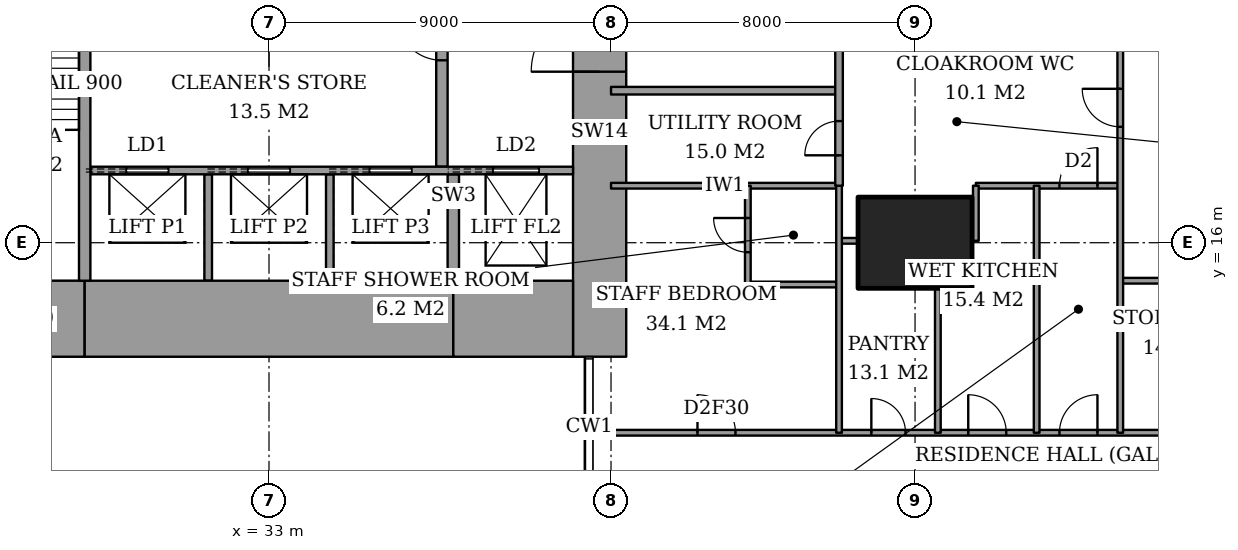
"""IFC4 building model, lengths in metres.
Left out: names, types, materials, properties, quantities, classifications, styles, units other than length and angle.
Written with IfcOpenShell. Run it as: python <this file> out.ifc"""

import sys

from ifc_helpers import new_model, si_unit, direction, frame, frame_2d, origin, origin_2d, place, context, subcontext, project, spatial, rectangle, extrude, element, fill, save


model = new_model("IFC4")
c1 = context("Model", 3, precision=1e-05, world=origin(), true_north=direction((0.0, 1.0)))
c2 = subcontext(c1, "Body", "Model", "MODEL_VIEW")
j1 = project(units=[si_unit("LENGTHUNIT", "METRE"), si_unit("PLANEANGLEUNIT", "RADIAN")], contexts=[c1])
p1 = place(None, origin())
s1 = spatial("IfcSite", under=j1, at=p1, CompositionType="ELEMENT")
p2 = place(p1, origin())
s2 = spatial("IfcBuilding", under=s1, at=p2, CompositionType="ELEMENT")
p3 = place(p2, frame((0.0, 0.0, 164.6)))
s3 = spatial("IfcBuildingStorey", under=s2, at=p3, CompositionType="ELEMENT", Elevation=164.6)
p4 = place(p3, frame((50.0, 16.0, 0.0), z_axis=(0.0, 0.0, 1.0), x_axis=(1.0, 0.0, 0.0)))
e1 = element("IfcColumn", 1, at=p4, inside=s3, PredefinedType="COLUMN", context=c2, shape_type="SweptSolid", body=[
    extrude(rectangle(XDim=3.0, YDim=2.4, at=origin_2d()), origin(), (0.0, 0.0, 1.0), 3.6),
])
p5 = place(p3, frame((25.0, 14.0, 0.0), z_axis=(0.0, 0.0, 1.0), x_axis=(1.0, 0.0, 0.0)))
e2 = element("IfcWall", 2, at=p5, inside=s3, PredefinedType="SHEAR", context=c2, shape_type="SweptSolid", body=[
    extrude(rectangle(XDim=3.15, YDim=2.0, at=frame_2d((1.575, 0.0))), origin(), (0.0, 0.0, 1.0), 3.6),
])
p6 = place(p3, frame((28.15, 14.0, 0.0), z_axis=(0.0, 0.0, 1.0), x_axis=(1.0, 0.0, 0.0)))
e3 = element("IfcWall", 3, at=p6, inside=s3, PredefinedType="SHEAR", context=c2, shape_type="SweptSolid", body=[
    extrude(rectangle(XDim=9.7, YDim=2.0, at=frame_2d((4.85, 0.0))), origin(), (0.0, 0.0, 1.0), 3.6),
])
p7 = place(p3, frame((37.85, 14.0, 0.0), z_axis=(0.0, 0.0, 1.0), x_axis=(1.0, 0.0, 0.0)))
e4 = element("IfcWall", 4, at=p7, inside=s3, PredefinedType="SHEAR", context=c2, shape_type="SweptSolid", body=[
    extrude(rectangle(XDim=3.15, YDim=2.0, at=frame_2d((1.575, 0.0))), origin(), (0.0, 0.0, 1.0), 3.6),
])
p8 = place(p3, frame((41.7, 13.0, 0.0), z_axis=(0.0, 0.0, 1.0), x_axis=(0.0, 1.0, 0.0)))
e5 = element("IfcWall", 5, at=p8, inside=s3, PredefinedType="SHEAR", context=c2, shape_type="SweptSolid", body=[
    extrude(rectangle(XDim=11.85, YDim=1.4, at=frame_2d((5.925, 0.0))), origin(), (0.0, 0.0, 1.0), 3.6),
])
p9 = place(p8, frame((7.5, 0.0, 0.0)))
e6 = element("IfcOpeningElement", 6, at=p9, cuts=e5, PredefinedType="OPENING", context=c2, shape_type="SweptSolid", body=[
    extrude(rectangle(XDim=1.8, YDim=2.4, at=frame_2d((0.9, 1.2))), frame((0.0, 0.71, 0.0), z_axis=(0.0, -1.0, 0.0), x_axis=(1.0, 0.0, 0.0)), (0.0, 0.0, 1.0), 1.42),
])
p10 = place(p3, frame((28.15, 15.0, 0.0), z_axis=(0.0, 0.0, 1.0), x_axis=(0.0, 1.0, 0.0)))
e7 = element("IfcWall", 7, at=p10, inside=s3, PredefinedType="SHEAR", context=c2, shape_type="SweptSolid", body=[
    extrude(rectangle(XDim=8.15, YDim=0.3, at=frame_2d((4.075, 0.0))), origin(), (0.0, 0.0, 1.0), 3.6),
])
p11 = place(p3, frame((37.55, 18.0, 0.0), z_axis=(0.0, 0.0, 1.0), x_axis=(0.0, 1.0, 0.0)))
e8 = element("IfcWall", 8, at=p11, inside=s3, PredefinedType="PARTITIONING", context=c2, shape_type="SweptSolid", body=[
    extrude(rectangle(XDim=6.7, YDim=0.3, at=frame_2d((3.35, 0.0))), origin(), (0.0, 0.0, 1.0), 3.6),
])
p12 = place(p11, frame((2.8, 0.0, 0.0)))
e9 = element("IfcOpeningElement", 9, at=p12, cuts=e8, PredefinedType="OPENING", context=c2, shape_type="SweptSolid", body=[
    extrude(rectangle(XDim=1.2, YDim=2.1, at=frame_2d((0.6, 1.05))), frame((0.0, 0.16, 0.0), z_axis=(0.0, -1.0, 0.0), x_axis=(1.0, 0.0, 0.0)), (0.0, 0.0, 1.0), 0.32),
])
p13 = place(p3, frame((41.439, 11.0, 0.0), z_axis=(0.0, 0.0, 1.0), x_axis=(1.0, 0.0, 0.0)))
e10 = element("IfcWall", 10, at=p13, inside=s3, PredefinedType="PARTITIONING", context=c2, shape_type="SweptSolid", body=[
    extrude(rectangle(XDim=25.011, YDim=0.15, at=frame_2d((12.505, 0.0))), origin(), (0.0, 0.0, 1.0), 3.35),
])
p14 = place(p13, frame((12.361, 0.0, 0.0)))
e11 = element("IfcOpeningElement", 11, at=p14, cuts=e10, PredefinedType="OPENING", context=c2, shape_type="SweptSolid", body=[
    extrude(rectangle(XDim=1.0, YDim=2.1, at=frame_2d((0.5, 1.05))), frame((0.0, 0.085, 0.0), z_axis=(0.0, -1.0, 0.0), x_axis=(1.0, 0.0, 0.0)), (0.0, 0.0, 1.0), 0.17),
])
p15 = place(p13, frame((20.924, 0.0, 0.0)))
e12 = element("IfcOpeningElement", 12, at=p15, cuts=e10, PredefinedType="OPENING", context=c2, shape_type="SweptSolid", body=[
    extrude(rectangle(XDim=1.0, YDim=2.1, at=frame_2d((0.5, 1.05))), frame((0.0, 0.085, 0.0), z_axis=(0.0, -1.0, 0.0), x_axis=(1.0, 0.0, 0.0)), (0.0, 0.0, 1.0), 0.17),
])
p16 = place(p13, frame((15.448, 0.0, 0.0)))
e13 = element("IfcOpeningElement", 13, at=p16, cuts=e10, PredefinedType="OPENING", context=c2, shape_type="SweptSolid", body=[
    extrude(rectangle(XDim=0.9, YDim=2.1, at=frame_2d((0.45, 1.05))), frame((0.0, 0.085, 0.0), z_axis=(0.0, -1.0, 0.0), x_axis=(1.0, 0.0, 0.0)), (0.0, 0.0, 1.0), 0.17),
])
p17 = place(p13, frame((9.961, 0.0, 0.0)))
e14 = element("IfcOpeningElement", 14, at=p17, cuts=e10, PredefinedType="OPENING", context=c2, shape_type="SweptSolid", body=[
    extrude(rectangle(XDim=1.0, YDim=2.1, at=frame_2d((0.5, 1.05))), frame((0.0, 0.085, 0.0), z_axis=(0.0, -1.0, 0.0), x_axis=(1.0, 0.0, 0.0)), (0.0, 0.0, 1.0), 0.17),
])
p18 = place(p13, frame((7.411, 0.0, 0.0)))
e15 = element("IfcOpeningElement", 15, at=p18, cuts=e10, PredefinedType="OPENING", context=c2, shape_type="SweptSolid", body=[
    extrude(rectangle(XDim=0.9, YDim=2.1, at=frame_2d((0.45, 1.05))), frame((0.0, 0.085, 0.0), z_axis=(0.0, -1.0, 0.0), x_axis=(1.0, 0.0, 0.0)), (0.0, 0.0, 1.0), 0.17),
])
p19 = place(p13, frame((2.836, 0.0, 0.0)))
e16 = element("IfcOpeningElement", 16, at=p19, cuts=e10, PredefinedType="OPENING", context=c2, shape_type="SweptSolid", body=[
    extrude(rectangle(XDim=1.0, YDim=2.1, at=frame_2d((0.5, 1.05))), frame((0.0, 0.085, 0.0), z_axis=(0.0, -1.0, 0.0), x_axis=(1.0, 0.0, 0.0)), (0.0, 0.0, 1.0), 0.17),
])
p20 = place(p3, frame((45.6, 14.9, 0.0), z_axis=(0.0, 0.0, 1.0), x_axis=(1.0, 0.0, 0.0)))
e17 = element("IfcWall", 17, at=p20, inside=s3, PredefinedType="PARTITIONING", context=c2, shape_type="SweptSolid", body=[
    extrude(rectangle(XDim=2.4, YDim=0.15, at=frame_2d((1.2, 0.0))), origin(), (0.0, 0.0, 1.0), 3.35),
])
p21 = place(p3, frame((55.4, 15.0, 0.0), z_axis=(0.0, 0.0, 1.0), x_axis=(1.0, 0.0, 0.0)))
e18 = element("IfcWall", 18, at=p21, inside=s3, PredefinedType="PARTITIONING", context=c2, shape_type="SweptSolid", body=[
    extrude(rectangle(XDim=1.1, YDim=0.15, at=frame_2d((0.55, 0.0))), origin(), (0.0, 0.0, 1.0), 3.35),
])
p22 = place(p3, frame((48.0, 16.05, 0.0), z_axis=(0.0, 0.0, 1.0), x_axis=(1.0, 0.0, 0.0)))
e19 = element("IfcWall", 19, at=p22, inside=s3, PredefinedType="PARTITIONING", context=c2, shape_type="SweptSolid", body=[
    extrude(rectangle(XDim=0.5, YDim=0.15, at=frame_2d((0.25, 0.0))), origin(), (0.0, 0.0, 1.0), 2.634),
])
p23 = place(p3, frame((42.0, 17.5, 0.0), z_axis=(0.0, 0.0, 1.0), x_axis=(1.0, 0.0, 0.0)))
e20 = element("IfcWall", 20, at=p23, inside=s3, PredefinedType="PARTITIONING", context=c2, shape_type="SweptSolid", body=[
    extrude(rectangle(XDim=6.0, YDim=0.15, at=frame_2d((3.0, 0.0))), origin(), (0.0, 0.0, 1.0), 3.35),
])
p24 = place(p3, frame((51.6, 17.5, 0.0), z_axis=(0.0, 0.0, 1.0), x_axis=(1.0, 0.0, 0.0)))
e21 = element("IfcWall", 21, at=p24, inside=s3, PredefinedType="PARTITIONING", context=c2, shape_type="SweptSolid", body=[
    extrude(rectangle(XDim=3.8, YDim=0.15, at=frame_2d((1.9, 0.0))), origin(), (0.0, 0.0, 1.0), 3.35),
])
p25 = place(p24, frame((2.2, 0.0, 0.0)))
e22 = element("IfcOpeningElement", 22, at=p25, cuts=e21, PredefinedType="OPENING", context=c2, shape_type="SweptSolid", body=[
    extrude(rectangle(XDim=1.0, YDim=2.1, at=frame_2d((0.5, 1.05))), frame((0.0, 0.085, 0.0), z_axis=(0.0, -1.0, 0.0), x_axis=(1.0, 0.0, 0.0)), (0.0, 0.0, 1.0), 0.17),
])
p26 = place(p3, frame((42.0, 20.0, 0.0), z_axis=(0.0, 0.0, 1.0), x_axis=(1.0, 0.0, 0.0)))
e23 = element("IfcWall", 23, at=p26, inside=s3, PredefinedType="PARTITIONING", context=c2, shape_type="SweptSolid", body=[
    extrude(rectangle(XDim=6.0, YDim=0.2, at=frame_2d((3.0, 0.0))), origin(), (0.0, 0.0, 1.0), 3.35),
])
p27 = place(p3, frame((45.6, 14.9, 0.0), z_axis=(0.0, 0.0, 1.0), x_axis=(0.0, 1.0, 0.0)))
e24 = element("IfcWall", 24, at=p27, inside=s3, PredefinedType="PARTITIONING", context=c2, shape_type="SweptSolid", body=[
    extrude(rectangle(XDim=2.6, YDim=0.15, at=frame_2d((1.3, 0.0))), origin(), (0.0, 0.0, 1.0), 3.35),
])
p28 = place(p27, frame((0.85, 0.0, 0.0)))
e25 = element("IfcOpeningElement", 25, at=p28, cuts=e24, PredefinedType="OPENING", context=c2, shape_type="SweptSolid", body=[
    extrude(rectangle(XDim=0.9, YDim=2.1, at=frame_2d((0.45, 1.05))), frame((0.0, 0.085, 0.0), z_axis=(0.0, -1.0, 0.0), x_axis=(1.0, 0.0, 0.0)), (0.0, 0.0, 1.0), 0.17),
])
p29 = place(p3, frame((48.0, 17.5, 0.0), z_axis=(0.0, 0.0, 1.0), x_axis=(0.0, 1.0, 0.0)))
e26 = element("IfcWall", 26, at=p29, inside=s3, PredefinedType="PARTITIONING", context=c2, shape_type="SweptSolid", body=[
    extrude(rectangle(XDim=6.5, YDim=0.2, at=frame_2d((3.25, 0.0))), origin(), (0.0, 0.0, 1.0), 3.35),
])
p30 = place(p29, frame((3.9, 0.0, 0.0)))
e27 = element("IfcOpeningElement", 27, at=p30, cuts=e26, PredefinedType="OPENING", context=c2, shape_type="SweptSolid", body=[
    extrude(rectangle(XDim=1.2, YDim=2.4, at=frame_2d((0.6, 1.2))), frame((0.0, 0.11, 0.0), z_axis=(0.0, -1.0, 0.0), x_axis=(1.0, 0.0, 0.0)), (0.0, 0.0, 1.0), 0.22),
])
p31 = place(p29, frame((0.8, 0.0, 0.0)))
e28 = element("IfcOpeningElement", 28, at=p31, cuts=e26, PredefinedType="OPENING", context=c2, shape_type="SweptSolid", body=[
    extrude(rectangle(XDim=0.9, YDim=2.1, at=frame_2d((0.45, 1.05))), frame((0.0, 0.11, 0.0), z_axis=(0.0, -1.0, 0.0), x_axis=(1.0, 0.0, 0.0)), (0.0, 0.0, 1.0), 0.22),
])
p32 = place(p3, frame((48.0, 11.0, 0.0), z_axis=(0.0, 0.0, 1.0), x_axis=(0.0, 1.0, 0.0)))
e29 = element("IfcWall", 29, at=p32, inside=s3, PredefinedType="PARTITIONING", context=c2, shape_type="SweptSolid", body=[
    extrude(rectangle(XDim=6.5, YDim=0.15, at=frame_2d((3.25, 0.0))), origin(), (0.0, 0.0, 1.0), 3.35),
])
p33 = place(p3, frame((50.6, 11.0, 0.0), z_axis=(0.0, 0.0, 1.0), x_axis=(0.0, 1.0, 0.0)))
e30 = element("IfcWall", 30, at=p33, inside=s3, PredefinedType="PARTITIONING", context=c2, shape_type="SweptSolid", body=[
    extrude(rectangle(XDim=3.8, YDim=0.15, at=frame_2d((1.9, 0.0))), origin(), (0.0, 0.0, 1.0), 3.35),
])
p34 = place(p3, frame((51.6, 16.05, 0.0), z_axis=(0.0, 0.0, 1.0), x_axis=(0.0, 1.0, 0.0)))
e31 = element("IfcWall", 31, at=p34, inside=s3, PredefinedType="PARTITIONING", context=c2, shape_type="SweptSolid", body=[
    extrude(rectangle(XDim=1.45, YDim=0.15, at=frame_2d((0.725, 0.0))), origin(), (0.0, 0.0, 1.0), 3.35),
])
p35 = place(p3, frame((53.2, 11.0, 0.0), z_axis=(0.0, 0.0, 1.0), x_axis=(0.0, 1.0, 0.0)))
e32 = element("IfcWall", 32, at=p35, inside=s3, PredefinedType="PARTITIONING", context=c2, shape_type="SweptSolid", body=[
    extrude(rectangle(XDim=6.5, YDim=0.15, at=frame_2d((3.25, 0.0))), origin(), (0.0, 0.0, 1.0), 3.35),
])
p36 = place(p3, frame((55.4, 11.0, 0.0), z_axis=(0.0, 0.0, 1.0), x_axis=(0.0, 1.0, 0.0)))
e33 = element("IfcWall", 33, at=p36, inside=s3, PredefinedType="PARTITIONING", context=c2, shape_type="SweptSolid", body=[
    extrude(rectangle(XDim=10.6, YDim=0.15, at=frame_2d((5.3, 0.0))), origin(), (0.0, 0.0, 1.0), 3.35),
])
p37 = place(p36, frame((8.05, 0.0, 0.0)))
e34 = element("IfcOpeningElement", 34, at=p37, cuts=e33, PredefinedType="OPENING", context=c2, shape_type="SweptSolid", body=[
    extrude(rectangle(XDim=1.0, YDim=2.1, at=frame_2d((0.5, 1.05))), frame((0.0, 0.085, 0.0), z_axis=(0.0, -1.0, 0.0), x_axis=(1.0, 0.0, 0.0)), (0.0, 0.0, 1.0), 0.17),
])
p38 = place(p3, frame((28.3, 17.9, 0.0), z_axis=(0.0, 0.0, 1.0), x_axis=(1.0, 0.0, 0.0)))
e35 = element("IfcWall", 35, at=p38, inside=s3, PredefinedType="PARTITIONING", context=c2, shape_type="SweptSolid", body=[
    extrude(rectangle(XDim=12.7, YDim=0.2, at=frame_2d((6.35, 0.0))), origin(), (0.0, 0.0, 1.0), 3.6),
])
p39 = place(p38, frame((0.95, 0.0, 0.0)))
e36 = element("IfcOpeningElement", 36, at=p39, cuts=e35, PredefinedType="OPENING", context=c2, shape_type="SweptSolid", body=[
    extrude(rectangle(XDim=1.1, YDim=2.1, at=frame_2d((0.55, 1.05))), frame((0.0, 0.11, 0.0), z_axis=(0.0, -1.0, 0.0), x_axis=(1.0, 0.0, 0.0)), (0.0, 0.0, 1.0), 0.22),
])
p40 = place(p38, frame((4.15, 0.0, 0.0)))
e37 = element("IfcOpeningElement", 37, at=p40, cuts=e35, PredefinedType="OPENING", context=c2, shape_type="SweptSolid", body=[
    extrude(rectangle(XDim=1.1, YDim=2.1, at=frame_2d((0.55, 1.05))), frame((0.0, 0.11, 0.0), z_axis=(0.0, -1.0, 0.0), x_axis=(1.0, 0.0, 0.0)), (0.0, 0.0, 1.0), 0.22),
])
p41 = place(p38, frame((7.35, 0.0, 0.0)))
e38 = element("IfcOpeningElement", 38, at=p41, cuts=e35, PredefinedType="OPENING", context=c2, shape_type="SweptSolid", body=[
    extrude(rectangle(XDim=1.1, YDim=2.1, at=frame_2d((0.55, 1.05))), frame((0.0, 0.11, 0.0), z_axis=(0.0, -1.0, 0.0), x_axis=(1.0, 0.0, 0.0)), (0.0, 0.0, 1.0), 0.22),
])
p42 = place(p38, frame((10.6, 0.0, 0.0)))
e39 = element("IfcOpeningElement", 39, at=p42, cuts=e35, PredefinedType="OPENING", context=c2, shape_type="SweptSolid", body=[
    extrude(rectangle(XDim=1.2, YDim=2.1, at=frame_2d((0.6, 1.05))), frame((0.0, 0.11, 0.0), z_axis=(0.0, -1.0, 0.0), x_axis=(1.0, 0.0, 0.0)), (0.0, 0.0, 1.0), 0.22),
])
for number, where, z_axis, x_axis in (
    (40, (31.4, 15.0, 0.0), (0.0, 0.0, 1.0), (0.0, 1.0, 0.0)),
    (41, (34.6, 15.0, 0.0), (0.0, 0.0, 1.0), (0.0, 1.0, 0.0)),
):
    element("IfcWall", number, at=place(p3, frame(where, z_axis=z_axis, x_axis=x_axis)), inside=s3, PredefinedType="PARTITIONING", context=c2, shape_type="SweptSolid", body=[
        extrude(rectangle(XDim=2.8, YDim=0.2, at=frame_2d((1.4, 0.0))), origin(), (0.0, 0.0, 1.0), 3.6),
    ])
p43 = place(p3, frame((37.85, 15.0, 0.0), z_axis=(0.0, 0.0, 1.0), x_axis=(0.0, 1.0, 0.0)))
e42 = element("IfcWall", 42, at=p43, inside=s3, PredefinedType="SHEAR", context=c2, shape_type="SweptSolid", body=[
    extrude(rectangle(XDim=2.8, YDim=0.3, at=frame_2d((1.4, 0.0))), origin(), (0.0, 0.0, 1.0), 3.6),
])
p44 = place(p14, origin())
e43 = element("IfcDoor", 43, at=p44, inside=s3, OperationType="SINGLE_SWING_LEFT", PredefinedType="DOOR", context=c2, shape_type="SweptSolid", body=[
    extrude(rectangle(XDim=1.0, YDim=2.1, at=frame_2d((0.5, 1.05))), frame((0.0, 0.025, 0.0), z_axis=(0.0, -1.0, 0.0), x_axis=(1.0, 0.0, 0.0)), (0.0, 0.0, 1.0), 0.05),
])
fill(e11, e43)
p45 = place(p37, origin())
e44 = element("IfcDoor", 44, at=p45, inside=s3, OperationType="SINGLE_SWING_LEFT", PredefinedType="DOOR", context=c2, shape_type="SweptSolid", body=[
    extrude(rectangle(XDim=1.0, YDim=2.1, at=frame_2d((0.5, 1.05))), frame((0.0, 0.025, 0.0), z_axis=(0.0, -1.0, 0.0), x_axis=(1.0, 0.0, 0.0)), (0.0, 0.0, 1.0), 0.05),
])
fill(e34, e44)
p46 = place(p25, origin())
e45 = element("IfcDoor", 45, at=p46, inside=s3, OperationType="SINGLE_SWING_LEFT", PredefinedType="DOOR", context=c2, shape_type="SweptSolid", body=[
    extrude(rectangle(XDim=1.0, YDim=2.1, at=frame_2d((0.5, 1.05))), frame((0.0, 0.025, 0.0), z_axis=(0.0, -1.0, 0.0), x_axis=(1.0, 0.0, 0.0)), (0.0, 0.0, 1.0), 0.05),
])
fill(e22, e45)
p47 = place(p17, origin())
e46 = element("IfcDoor", 46, at=p47, inside=s3, OperationType="SINGLE_SWING_RIGHT", PredefinedType="DOOR", context=c2, shape_type="SweptSolid", body=[
    extrude(rectangle(XDim=1.0, YDim=2.1, at=frame_2d((0.5, 1.05))), frame((0.0, 0.025, 0.0), z_axis=(0.0, -1.0, 0.0), x_axis=(1.0, 0.0, 0.0)), (0.0, 0.0, 1.0), 0.05),
])
fill(e14, e46)
p48 = place(p18, origin())
e47 = element("IfcDoor", 47, at=p48, inside=s3, OperationType="SINGLE_SWING_RIGHT", PredefinedType="DOOR", context=c2, shape_type="SweptSolid", body=[
    extrude(rectangle(XDim=0.9, YDim=2.1, at=frame_2d((0.45, 1.05))), frame((0.0, 0.025, 0.0), z_axis=(0.0, -1.0, 0.0), x_axis=(1.0, 0.0, 0.0)), (0.0, 0.0, 1.0), 0.05),
])
fill(e15, e47)
p49 = place(p28, origin())
e48 = element("IfcDoor", 48, at=p49, inside=s3, OperationType="SINGLE_SWING_LEFT", PredefinedType="DOOR", context=c2, shape_type="SweptSolid", body=[
    extrude(rectangle(XDim=0.9, YDim=2.1, at=frame_2d((0.45, 1.05))), frame((0.0, 0.025, 0.0), z_axis=(0.0, -1.0, 0.0), x_axis=(1.0, 0.0, 0.0)), (0.0, 0.0, 1.0), 0.05),
])
fill(e25, e48)
p50 = place(p19, origin())
e49 = element("IfcDoor", 49, at=p50, inside=s3, OperationType="SINGLE_SWING_RIGHT", PredefinedType="DOOR", context=c2, shape_type="SweptSolid", body=[
    extrude(rectangle(XDim=1.0, YDim=2.1, at=frame_2d((0.5, 1.05))), frame((0.0, 0.025, 0.0), z_axis=(0.0, -1.0, 0.0), x_axis=(1.0, 0.0, 0.0)), (0.0, 0.0, 1.0), 0.05),
])
fill(e16, e49)
p51 = place(p31, origin())
e50 = element("IfcDoor", 50, at=p51, inside=s3, OperationType="SINGLE_SWING_RIGHT", PredefinedType="DOOR", context=c2, shape_type="SweptSolid", body=[
    extrude(rectangle(XDim=0.9, YDim=2.1, at=frame_2d((0.45, 1.05))), frame((0.0, 0.025, 0.0), z_axis=(0.0, -1.0, 0.0), x_axis=(1.0, 0.0, 0.0)), (0.0, 0.0, 1.0), 0.05),
])
fill(e28, e50)
p52 = place(p12, origin())
e51 = element("IfcDoor", 51, at=p52, inside=s3, OperationType="SINGLE_SWING_LEFT", PredefinedType="DOOR", context=c2, shape_type="SweptSolid", body=[
    extrude(rectangle(XDim=1.2, YDim=2.1, at=frame_2d((0.6, 1.05))), frame((0.0, 0.025, 0.0), z_axis=(0.0, -1.0, 0.0), x_axis=(1.0, 0.0, 0.0)), (0.0, 0.0, 1.0), 0.05),
])
fill(e9, e51)
p53 = place(p9, origin())
e52 = element("IfcDoor", 52, at=p53, inside=s3, OperationType="DOUBLE_DOOR_DOUBLE_SWING", PredefinedType="DOOR", context=c2, shape_type="SweptSolid", body=[
    extrude(rectangle(XDim=1.8, YDim=2.4, at=frame_2d((0.9, 1.2))), frame((0.0, 0.025, 0.0), z_axis=(0.0, -1.0, 0.0), x_axis=(1.0, 0.0, 0.0)), (0.0, 0.0, 1.0), 0.05),
])
fill(e6, e52)
p54 = place(p39, origin())
e53 = element("IfcDoor", 53, at=p54, inside=s3, OperationType="SLIDING_TO_LEFT", PredefinedType="DOOR", context=c2, shape_type="SweptSolid", body=[
    extrude(rectangle(XDim=1.1, YDim=2.1, at=frame_2d((0.55, 1.05))), frame((0.0, 0.025, 0.0), z_axis=(0.0, -1.0, 0.0), x_axis=(1.0, 0.0, 0.0)), (0.0, 0.0, 1.0), 0.05),
])
fill(e36, e53)
p55 = place(p40, origin())
e54 = element("IfcDoor", 54, at=p55, inside=s3, OperationType="SLIDING_TO_LEFT", PredefinedType="DOOR", context=c2, shape_type="SweptSolid", body=[
    extrude(rectangle(XDim=1.1, YDim=2.1, at=frame_2d((0.55, 1.05))), frame((0.0, 0.025, 0.0), z_axis=(0.0, -1.0, 0.0), x_axis=(1.0, 0.0, 0.0)), (0.0, 0.0, 1.0), 0.05),
])
fill(e37, e54)
p56 = place(p41, origin())
e55 = element("IfcDoor", 55, at=p56, inside=s3, OperationType="SLIDING_TO_LEFT", PredefinedType="DOOR", context=c2, shape_type="SweptSolid", body=[
    extrude(rectangle(XDim=1.1, YDim=2.1, at=frame_2d((0.55, 1.05))), frame((0.0, 0.025, 0.0), z_axis=(0.0, -1.0, 0.0), x_axis=(1.0, 0.0, 0.0)), (0.0, 0.0, 1.0), 0.05),
])
fill(e38, e55)
p57 = place(p42, origin())
e56 = element("IfcDoor", 56, at=p57, inside=s3, OperationType="SLIDING_TO_LEFT", PredefinedType="DOOR", context=c2, shape_type="SweptSolid", body=[
    extrude(rectangle(XDim=1.2, YDim=2.1, at=frame_2d((0.6, 1.05))), frame((0.0, 0.025, 0.0), z_axis=(0.0, -1.0, 0.0), x_axis=(1.0, 0.0, 0.0)), (0.0, 0.0, 1.0), 0.05),
])
fill(e39, e56)
save(model, sys.argv[1])
